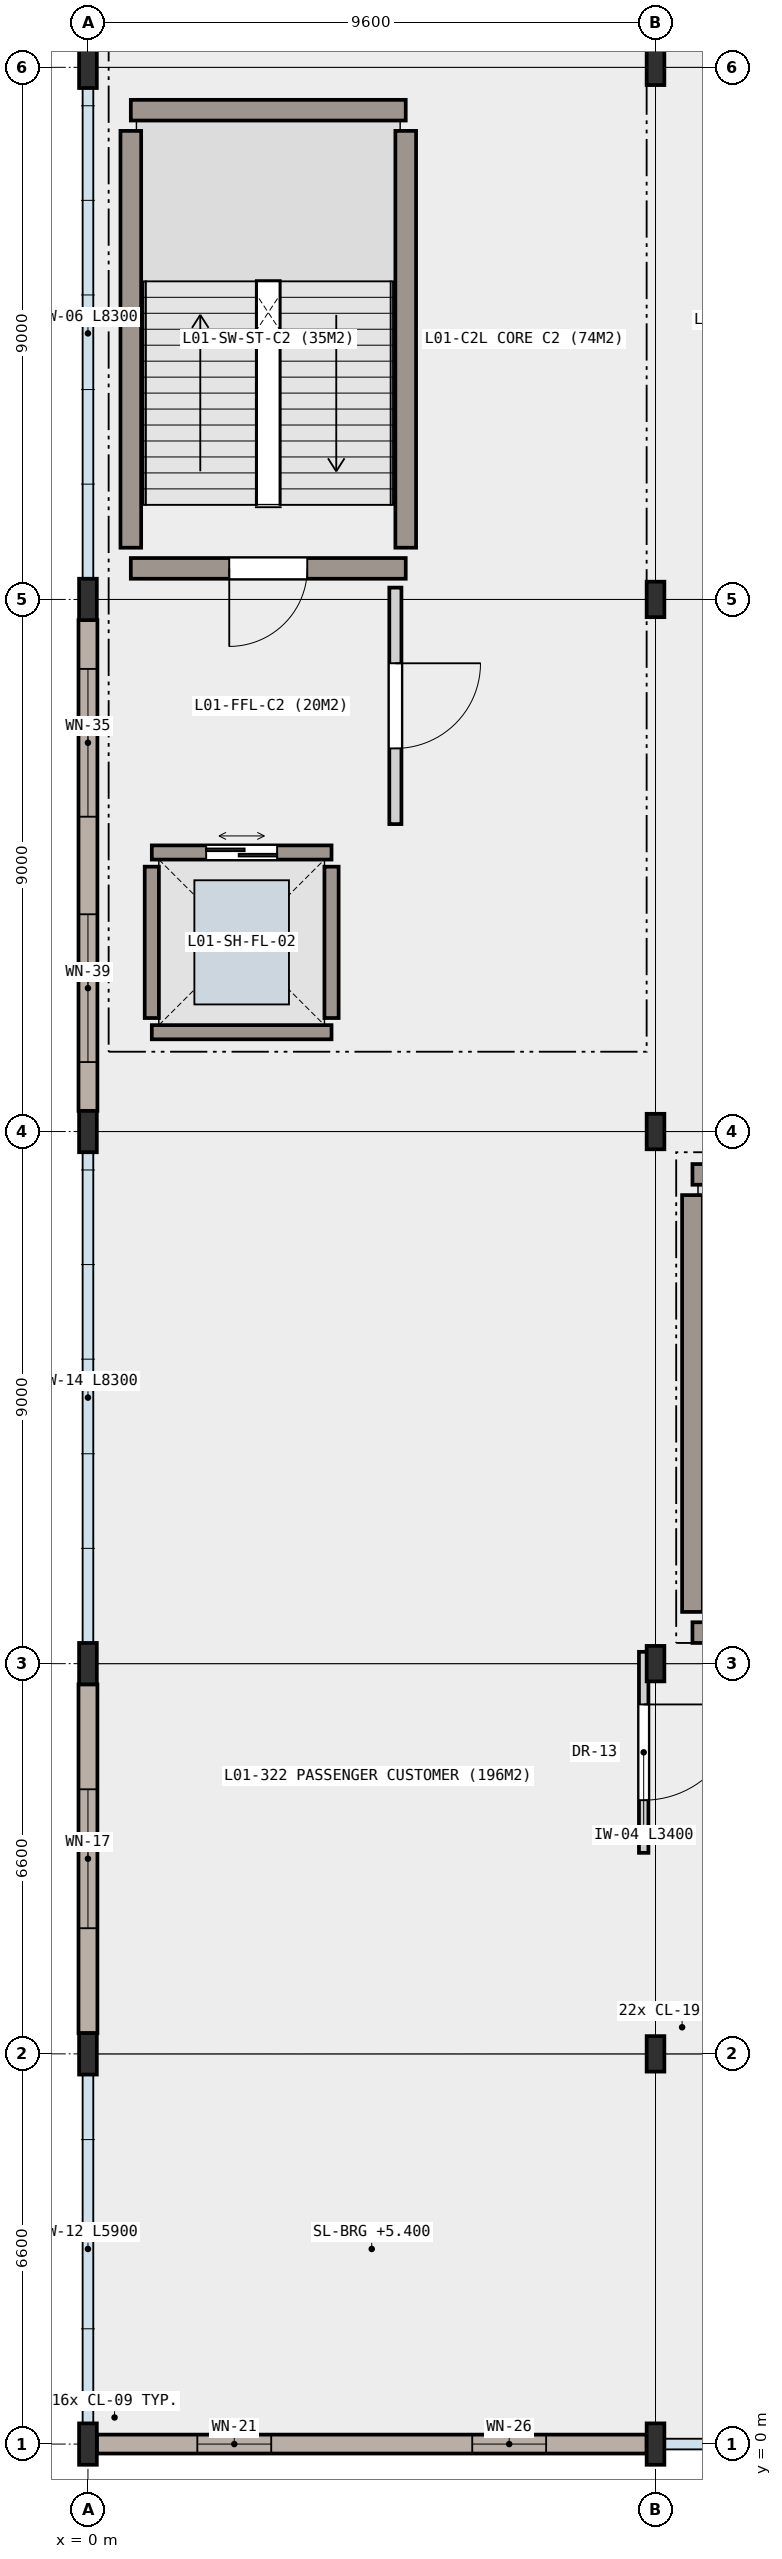
"""IFC4 building model, lengths in metres.
Left out: names, types, materials, properties, quantities, classifications, styles, units other than length and angle.
Written with IfcOpenShell. Run it as: python <this file> out.ifc"""

import sys

from ifc_helpers import new_model, si_unit, direction, frame, frame_2d, origin, origin_2d, place, context, subcontext, project, spatial, rectangle, i_section, extrude, element, fill, save


model = new_model("IFC4")
c1 = context("Model", 3, precision=1e-05, world=origin(), true_north=direction((0.0, 1.0)))
c2 = subcontext(c1, "Body", "Model", "MODEL_VIEW")
j1 = project(units=[si_unit("LENGTHUNIT", "METRE"), si_unit("PLANEANGLEUNIT", "RADIAN")], contexts=[c1])
p1 = place(None, origin())
s1 = spatial("IfcSite", under=j1, at=p1, CompositionType="ELEMENT")
p2 = place(p1, origin())
s2 = spatial("IfcBuilding", under=s1, at=p2, CompositionType="ELEMENT")
p3 = place(p2, frame((0.0, 0.0, 5.4)))
s3 = spatial("IfcBuildingStorey", under=s2, at=p3, CompositionType="ELEMENT", Elevation=5.4)
for number, where, z_axis, x_axis in (
    (1, (0.0, 0.0, 0.0), (0.0, 0.0, 1.0), (1.0, 0.0, 0.0)),
    (2, (0.0, 6.6, 0.0), (0.0, 0.0, 1.0), (1.0, 0.0, 0.0)),
    (3, (0.0, 13.2, 0.0), (0.0, 0.0, 1.0), (1.0, 0.0, 0.0)),
    (4, (0.0, 22.2, 0.0), (0.0, 0.0, 1.0), (1.0, 0.0, 0.0)),
    (5, (0.0, 31.2, 0.0), (0.0, 0.0, 1.0), (1.0, 0.0, 0.0)),
    (6, (0.0, 40.2, 0.0), (0.0, 0.0, 1.0), (1.0, 0.0, 0.0)),
    (7, (9.6, 0.0, 0.0), (0.0, 0.0, 1.0), (1.0, 0.0, 0.0)),
):
    element("IfcColumn", number, at=place(p3, frame(where, z_axis=z_axis, x_axis=x_axis)), inside=s3, PredefinedType="COLUMN", context=c2, shape_type="SweptSolid", body=[
        extrude(i_section(OverallWidth=0.3, OverallDepth=0.7, WebThickness=0.017, FlangeThickness=0.032, FilletRadius=0.027, at=origin_2d()), origin(), (0.0, 0.0, 1.0), 4.8),
    ])
for number, where, z_axis, x_axis in (
    (8, (9.6, 6.6, 0.0), (0.0, 0.0, 1.0), (1.0, 0.0, 0.0)),
    (9, (9.6, 13.2, 0.0), (0.0, 0.0, 1.0), (1.0, 0.0, 0.0)),
    (10, (9.6, 22.2, 0.0), (0.0, 0.0, 1.0), (1.0, 0.0, 0.0)),
    (11, (9.6, 31.2, 0.0), (0.0, 0.0, 1.0), (1.0, 0.0, 0.0)),
    (12, (9.6, 40.2, 0.0), (0.0, 0.0, 1.0), (1.0, 0.0, 0.0)),
):
    element("IfcColumn", number, at=place(p3, frame(where, z_axis=z_axis, x_axis=x_axis)), inside=s3, PredefinedType="COLUMN", context=c2, shape_type="SweptSolid", body=[
        extrude(i_section(OverallWidth=0.3, OverallDepth=0.6, WebThickness=0.015, FlangeThickness=0.03, FilletRadius=0.027, at=origin_2d()), origin(), (0.0, 0.0, 1.0), 4.8),
    ])
p4 = place(p3, frame((0.0, 6.95, 0.0), z_axis=(0.0, 0.0, 1.0), x_axis=(0.0, 1.0, 0.0)))
e13 = element("IfcWall", 13, at=p4, inside=s3, PredefinedType="SOLIDWALL", context=c2, shape_type="SweptSolid", body=[
    extrude(rectangle(XDim=5.9, YDim=0.32, at=frame_2d((2.95, 0.0))), origin(), (0.0, 0.0, 1.0), 4.11),
])
p5 = place(p4, frame((1.775, 0.0, 0.85)))
e14 = element("IfcOpeningElement", 14, at=p5, cuts=e13, PredefinedType="OPENING", context=c2, shape_type="SweptSolid", body=[
    extrude(rectangle(XDim=2.35, YDim=2.15, at=frame_2d((1.175, 1.075))), frame((0.0, 0.17, 0.0), z_axis=(0.0, -1.0, 0.0), x_axis=(1.0, 0.0, 0.0)), (0.0, 0.0, 1.0), 0.34),
])
p6 = place(p3, frame((0.0, 22.55, 0.0), z_axis=(0.0, 0.0, 1.0), x_axis=(0.0, 1.0, 0.0)))
e15 = element("IfcWall", 15, at=p6, inside=s3, PredefinedType="SOLIDWALL", context=c2, shape_type="SweptSolid", body=[
    extrude(rectangle(XDim=8.3, YDim=0.32, at=frame_2d((4.15, 0.0))), origin(), (0.0, 0.0, 1.0), 4.11),
])
p7 = place(p6, frame((0.825, 0.0, 0.85)))
e16 = element("IfcOpeningElement", 16, at=p7, cuts=e15, PredefinedType="OPENING", context=c2, shape_type="SweptSolid", body=[
    extrude(rectangle(XDim=2.5, YDim=1.5, at=frame_2d((1.25, 0.75))), frame((0.0, 0.17, 0.0), z_axis=(0.0, -1.0, 0.0), x_axis=(1.0, 0.0, 0.0)), (0.0, 0.0, 1.0), 0.34),
])
p8 = place(p6, frame((4.975, 0.0, 0.85)))
e17 = element("IfcOpeningElement", 17, at=p8, cuts=e15, PredefinedType="OPENING", context=c2, shape_type="SweptSolid", body=[
    extrude(rectangle(XDim=2.5, YDim=1.85, at=frame_2d((1.25, 0.925))), frame((0.0, 0.17, 0.0), z_axis=(0.0, -1.0, 0.0), x_axis=(1.0, 0.0, 0.0)), (0.0, 0.0, 1.0), 0.34),
])
p9 = place(p3, frame((9.45, 0.0, 0.0), z_axis=(0.0, 0.0, 1.0), x_axis=(-1.0, 0.0, 0.0)))
e18 = element("IfcWall", 18, at=p9, inside=s3, PredefinedType="SOLIDWALL", context=c2, shape_type="SweptSolid", body=[
    extrude(rectangle(XDim=9.3, YDim=0.32, at=frame_2d((4.65, 0.0))), origin(), (0.0, 0.0, 1.0), 4.11),
])
p10 = place(p9, frame((1.7, 0.0, 0.85)))
e19 = element("IfcOpeningElement", 19, at=p10, cuts=e18, PredefinedType="OPENING", context=c2, shape_type="SweptSolid", body=[
    extrude(rectangle(XDim=1.25, YDim=1.5, at=frame_2d((0.625, 0.75))), frame((0.0, 0.17, 0.0), z_axis=(0.0, -1.0, 0.0), x_axis=(1.0, 0.0, 0.0)), (0.0, 0.0, 1.0), 0.34),
])
p11 = place(p9, frame((6.35, 0.0, 0.85)))
e20 = element("IfcOpeningElement", 20, at=p11, cuts=e18, PredefinedType="OPENING", context=c2, shape_type="SweptSolid", body=[
    extrude(rectangle(XDim=1.25, YDim=1.85, at=frame_2d((0.625, 0.925))), frame((0.0, 0.17, 0.0), z_axis=(0.0, -1.0, 0.0), x_axis=(1.0, 0.0, 0.0)), (0.0, 0.0, 1.0), 0.34),
])
p12 = place(p3, frame((4.12, 23.88, 0.0), z_axis=(0.0, 0.0, 1.0), x_axis=(-1.0, 0.0, 0.0)))
e21 = element("IfcWall", 21, at=p12, inside=s3, PredefinedType="SHEAR", context=c2, shape_type="SweptSolid", body=[
    extrude(rectangle(XDim=3.04, YDim=0.24, at=frame_2d((1.52, 0.0))), origin(), (0.0, 0.0, 1.0), 4.54),
])
p13 = place(p3, frame((1.08, 26.92, 0.0), z_axis=(0.0, 0.0, 1.0), x_axis=(1.0, 0.0, 0.0)))
e22 = element("IfcWall", 22, at=p13, inside=s3, PredefinedType="SHEAR", context=c2, shape_type="SweptSolid", body=[
    extrude(rectangle(XDim=3.04, YDim=0.24, at=frame_2d((1.52, 0.0))), origin(), (0.0, 0.0, 1.0), 4.54),
])
p14 = place(p13, frame((0.92, 0.0, 0.0)))
e23 = element("IfcOpeningElement", 23, at=p14, cuts=e22, PredefinedType="OPENING", context=c2, shape_type="SweptSolid", body=[
    extrude(rectangle(XDim=1.2, YDim=2.15, at=frame_2d((0.6, 1.075))), frame((0.0, 0.13, 0.0), z_axis=(0.0, -1.0, 0.0), x_axis=(1.0, 0.0, 0.0)), (0.0, 0.0, 1.0), 0.26),
])
for number, where, z_axis, x_axis in (
    (24, (1.08, 24.12, 0.0), (0.0, 0.0, 1.0), (0.0, 1.0, 0.0)),
    (25, (4.12, 26.68, 0.0), (0.0, 0.0, 1.0), (0.0, -1.0, 0.0)),
):
    element("IfcWall", number, at=place(p3, frame(where, z_axis=z_axis, x_axis=x_axis)), inside=s3, PredefinedType="SHEAR", context=c2, shape_type="SweptSolid", body=[
        extrude(rectangle(XDim=2.56, YDim=0.24, at=frame_2d((1.28, 0.0))), origin(), (0.0, 0.0, 1.0), 4.54),
    ])
p15 = place(p3, frame((14.875, 13.725, 0.0), z_axis=(0.0, 0.0, 1.0), x_axis=(-1.0, 0.0, 0.0)))
e26 = element("IfcWall", 26, at=p15, inside=s3, PredefinedType="SHEAR", context=c2, shape_type="SweptSolid", body=[
    extrude(rectangle(XDim=4.65, YDim=0.35, at=frame_2d((2.325, 0.0))), origin(), (0.0, 0.0, 1.0), 4.54),
])
p16 = place(p15, frame((1.665, 0.0, 0.0)))
e27 = element("IfcOpeningElement", 27, at=p16, cuts=e26, PredefinedType="OPENING", context=c2, shape_type="SweptSolid", body=[
    extrude(rectangle(XDim=1.32, YDim=2.15, at=frame_2d((0.66, 1.075))), frame((0.0, 0.185, 0.0), z_axis=(0.0, -1.0, 0.0), x_axis=(1.0, 0.0, 0.0)), (0.0, 0.0, 1.0), 0.37),
])
p17 = place(p3, frame((10.225, 21.475, 0.0), z_axis=(0.0, 0.0, 1.0), x_axis=(1.0, 0.0, 0.0)))
e28 = element("IfcWall", 28, at=p17, inside=s3, PredefinedType="SHEAR", context=c2, shape_type="SweptSolid", body=[
    extrude(rectangle(XDim=4.825, YDim=0.35, at=frame_2d((2.413, 0.0))), origin(), (0.0, 0.0, 1.0), 4.54),
])
p18 = place(p3, frame((10.225, 14.075, 0.0), z_axis=(0.0, 0.0, 1.0), x_axis=(0.0, 1.0, 0.0)))
e29 = element("IfcWall", 29, at=p18, inside=s3, PredefinedType="SHEAR", context=c2, shape_type="SweptSolid", body=[
    extrude(rectangle(XDim=7.05, YDim=0.35, at=frame_2d((3.525, 0.0))), origin(), (0.0, 0.0, 1.0), 4.54),
])
p19 = place(p3, frame((5.375, 31.725, 0.0), z_axis=(0.0, 0.0, 1.0), x_axis=(-1.0, 0.0, 0.0)))
e30 = element("IfcWall", 30, at=p19, inside=s3, PredefinedType="SHEAR", context=c2, shape_type="SweptSolid", body=[
    extrude(rectangle(XDim=4.65, YDim=0.35, at=frame_2d((2.325, 0.0))), origin(), (0.0, 0.0, 1.0), 4.54),
])
p20 = place(p19, frame((1.665, 0.0, 0.0)))
e31 = element("IfcOpeningElement", 31, at=p20, cuts=e30, PredefinedType="OPENING", context=c2, shape_type="SweptSolid", body=[
    extrude(rectangle(XDim=1.32, YDim=2.15, at=frame_2d((0.66, 1.075))), frame((0.0, 0.185, 0.0), z_axis=(0.0, -1.0, 0.0), x_axis=(1.0, 0.0, 0.0)), (0.0, 0.0, 1.0), 0.37),
])
p21 = place(p3, frame((0.725, 39.475, 0.0), z_axis=(0.0, 0.0, 1.0), x_axis=(1.0, 0.0, 0.0)))
e32 = element("IfcWall", 32, at=p21, inside=s3, PredefinedType="SHEAR", context=c2, shape_type="SweptSolid", body=[
    extrude(rectangle(XDim=4.65, YDim=0.35, at=frame_2d((2.325, 0.0))), origin(), (0.0, 0.0, 1.0), 4.54),
])
for number, where, z_axis, x_axis in (
    (33, (0.725, 32.075, 0.0), (0.0, 0.0, 1.0), (0.0, 1.0, 0.0)),
    (34, (5.375, 39.125, 0.0), (0.0, 0.0, 1.0), (0.0, -1.0, 0.0)),
):
    element("IfcWall", number, at=place(p3, frame(where, z_axis=z_axis, x_axis=x_axis)), inside=s3, PredefinedType="SHEAR", context=c2, shape_type="SweptSolid", body=[
        extrude(rectangle(XDim=7.05, YDim=0.35, at=frame_2d((3.525, 0.0))), origin(), (0.0, 0.0, 1.0), 4.54),
    ])
p22 = place(p3, frame((5.2, 31.4, 0.0), z_axis=(0.0, 0.0, 1.0), x_axis=(0.0, -1.0, 0.0)))
e35 = element("IfcWall", 35, at=p22, inside=s3, PredefinedType="PARTITIONING", context=c2, shape_type="SweptSolid", body=[
    extrude(rectangle(XDim=4.0, YDim=0.205, at=frame_2d((2.0, 0.0))), origin(), (0.0, 0.0, 1.0), 4.54),
])
p23 = place(p22, frame((1.28, 0.0, 0.0)))
e36 = element("IfcOpeningElement", 36, at=p23, cuts=e35, PredefinedType="OPENING", context=c2, shape_type="SweptSolid", body=[
    extrude(rectangle(XDim=1.44, YDim=2.18, at=frame_2d((0.72, 1.09))), frame((0.0, 0.113, 0.0), z_axis=(0.0, -1.0, 0.0), x_axis=(1.0, 0.0, 0.0)), (0.0, 0.0, 1.0), 0.225),
])
p24 = place(p3, frame((9.4, 13.4, 0.0), z_axis=(0.0, 0.0, 1.0), x_axis=(0.0, -1.0, 0.0)))
e37 = element("IfcWall", 37, at=p24, inside=s3, PredefinedType="PARTITIONING", context=c2, shape_type="SweptSolid", body=[
    extrude(rectangle(XDim=3.4, YDim=0.16, at=frame_2d((1.7, 0.0))), origin(), (0.0, 0.0, 1.0), 4.01),
])
p25 = place(p24, frame((0.89, 0.0, 0.0)))
e38 = element("IfcOpeningElement", 38, at=p25, cuts=e37, PredefinedType="OPENING", context=c2, shape_type="SweptSolid", body=[
    extrude(rectangle(XDim=1.62, YDim=2.22, at=frame_2d((0.81, 1.11))), frame((0.0, 0.09, 0.0), z_axis=(0.0, -1.0, 0.0), x_axis=(1.0, 0.0, 0.0)), (0.0, 0.0, 1.0), 0.18),
])
p26 = place(p5, origin())
e39 = element("IfcWindow", 39, at=p26, inside=s3, PartitioningType="SINGLE_PANEL", PredefinedType="WINDOW", context=c2, shape_type="SweptSolid", body=[
    extrude(rectangle(XDim=2.35, YDim=2.15, at=frame_2d((1.175, 1.075))), frame((0.0, 0.03, 0.0), z_axis=(0.0, -1.0, 0.0), x_axis=(1.0, 0.0, 0.0)), (0.0, 0.0, 1.0), 0.06),
])
fill(e14, e39)
p27 = place(p7, origin())
e40 = element("IfcWindow", 40, at=p27, inside=s3, PartitioningType="SINGLE_PANEL", PredefinedType="WINDOW", context=c2, shape_type="SweptSolid", body=[
    extrude(rectangle(XDim=2.5, YDim=1.5, at=frame_2d((1.25, 0.75))), frame((0.0, 0.03, 0.0), z_axis=(0.0, -1.0, 0.0), x_axis=(1.0, 0.0, 0.0)), (0.0, 0.0, 1.0), 0.06),
])
fill(e16, e40)
p28 = place(p8, origin())
e41 = element("IfcWindow", 41, at=p28, inside=s3, PartitioningType="SINGLE_PANEL", PredefinedType="WINDOW", context=c2, shape_type="SweptSolid", body=[
    extrude(rectangle(XDim=2.5, YDim=1.85, at=frame_2d((1.25, 0.925))), frame((0.0, 0.03, 0.0), z_axis=(0.0, -1.0, 0.0), x_axis=(1.0, 0.0, 0.0)), (0.0, 0.0, 1.0), 0.06),
])
fill(e17, e41)
p29 = place(p10, origin())
e42 = element("IfcWindow", 42, at=p29, inside=s3, PartitioningType="SINGLE_PANEL", PredefinedType="WINDOW", context=c2, shape_type="SweptSolid", body=[
    extrude(rectangle(XDim=1.25, YDim=1.5, at=frame_2d((0.625, 0.75))), frame((0.0, 0.03, 0.0), z_axis=(0.0, -1.0, 0.0), x_axis=(1.0, 0.0, 0.0)), (0.0, 0.0, 1.0), 0.06),
])
fill(e19, e42)
p30 = place(p11, origin())
e43 = element("IfcWindow", 43, at=p30, inside=s3, PartitioningType="SINGLE_PANEL", PredefinedType="WINDOW", context=c2, shape_type="SweptSolid", body=[
    extrude(rectangle(XDim=1.25, YDim=1.85, at=frame_2d((0.625, 0.925))), frame((0.0, 0.03, 0.0), z_axis=(0.0, -1.0, 0.0), x_axis=(1.0, 0.0, 0.0)), (0.0, 0.0, 1.0), 0.06),
])
fill(e20, e43)
p31 = place(p14, origin())
e44 = element("IfcDoor", 44, at=p31, inside=s3, OperationType="DOUBLE_DOOR_SLIDING", PredefinedType="DOOR", context=c2, shape_type="SweptSolid", body=[
    extrude(rectangle(XDim=1.2, YDim=2.15, at=frame_2d((0.6, 1.075))), frame((0.0, 0.025, 0.0), z_axis=(0.0, -1.0, 0.0), x_axis=(1.0, 0.0, 0.0)), (0.0, 0.0, 1.0), 0.05),
])
fill(e23, e44)
p32 = place(p20, origin())
e45 = element("IfcDoor", 45, at=p32, inside=s3, OperationType="SINGLE_SWING_RIGHT", PredefinedType="DOOR", context=c2, shape_type="SweptSolid", body=[
    extrude(rectangle(XDim=1.32, YDim=2.15, at=frame_2d((0.66, 1.075))), frame((0.0, 0.025, 0.0), z_axis=(0.0, -1.0, 0.0), x_axis=(1.0, 0.0, 0.0)), (0.0, 0.0, 1.0), 0.05),
])
fill(e31, e45)
p33 = place(p23, origin())
e46 = element("IfcDoor", 46, at=p33, inside=s3, OperationType="SINGLE_SWING_LEFT", PredefinedType="DOOR", context=c2, shape_type="SweptSolid", body=[
    extrude(rectangle(XDim=1.44, YDim=2.18, at=frame_2d((0.72, 1.09))), frame((0.0, 0.025, 0.0), z_axis=(0.0, -1.0, 0.0), x_axis=(1.0, 0.0, 0.0)), (0.0, 0.0, 1.0), 0.05),
])
fill(e36, e46)
p34 = place(p25, origin())
e47 = element("IfcDoor", 47, at=p34, inside=s3, OperationType="SINGLE_SWING_LEFT", PredefinedType="DOOR", context=c2, shape_type="SweptSolid", body=[
    extrude(rectangle(XDim=1.62, YDim=2.22, at=frame_2d((0.81, 1.11))), frame((0.0, 0.025, 0.0), z_axis=(0.0, -1.0, 0.0), x_axis=(1.0, 0.0, 0.0)), (0.0, 0.0, 1.0), 0.05),
])
fill(e38, e47)
save(model, sys.argv[1])
